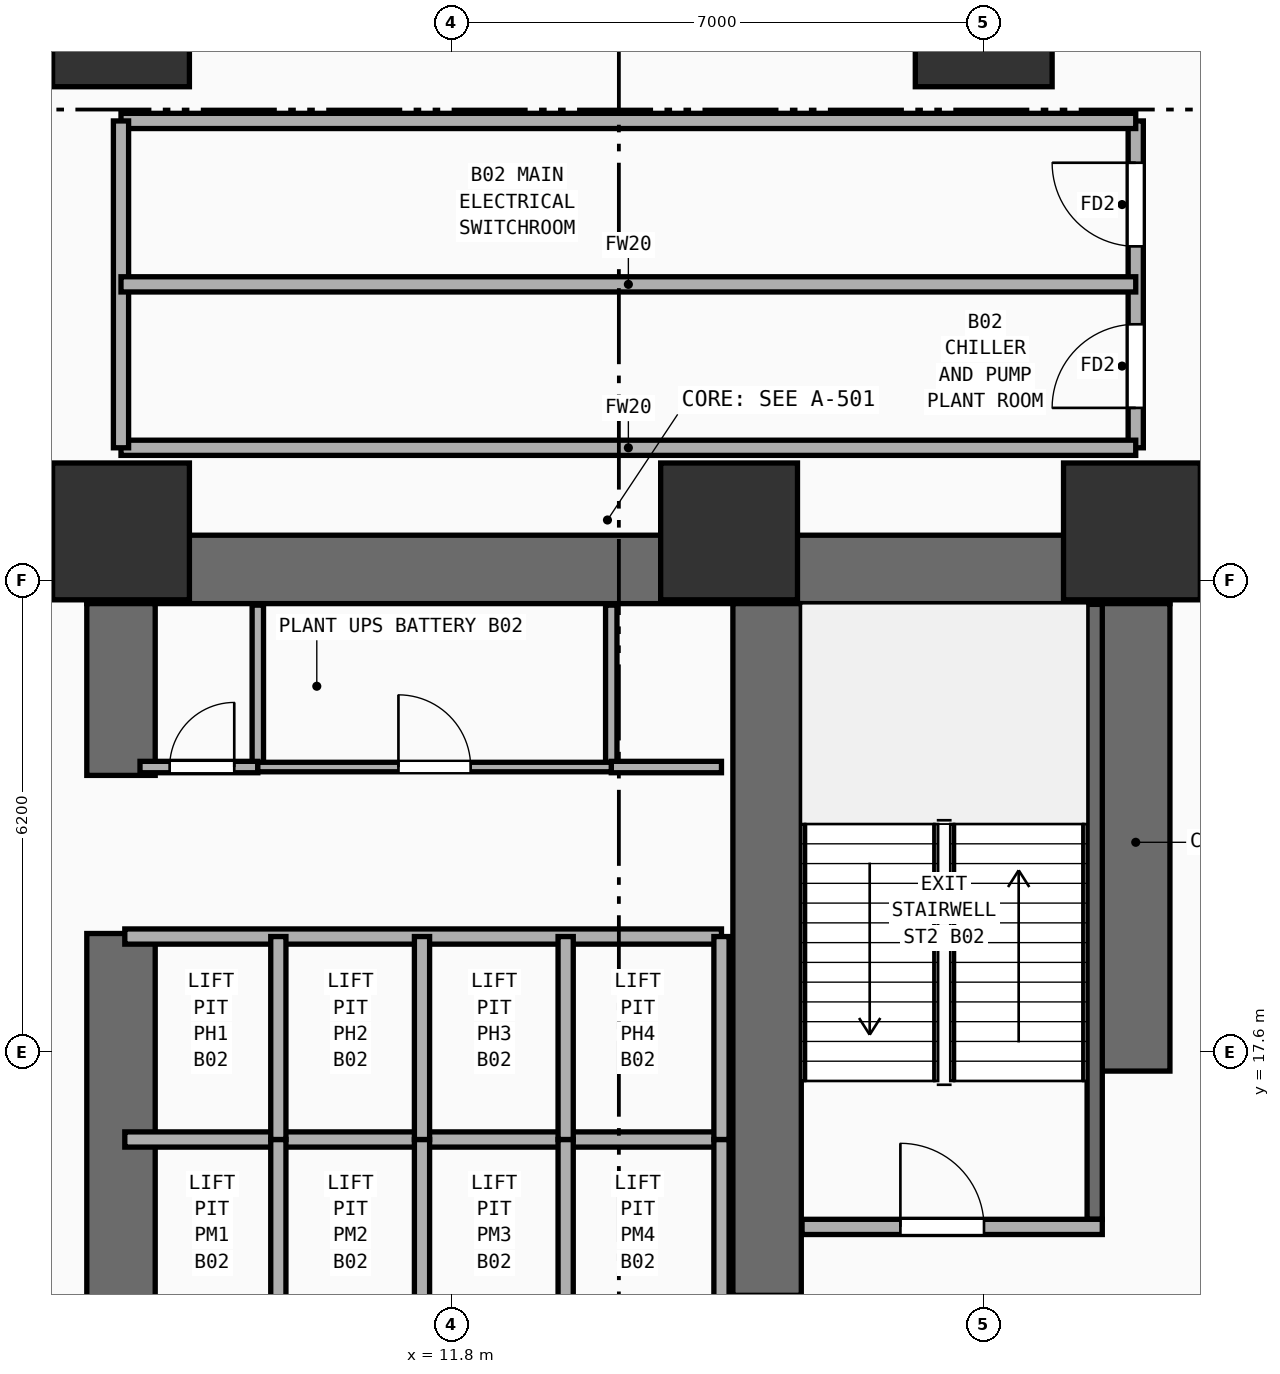
"""IFC4 building model, lengths in metres.
Left out: names, types, materials, properties, quantities, classifications, styles, units other than length and angle.
Written with IfcOpenShell. Run it as: python <this file> out.ifc"""

import sys

from ifc_helpers import new_model, si_unit, direction, frame, frame_2d, origin, origin_2d, place, context, subcontext, project, spatial, rectangle, extrude, element, fill, save


model = new_model("IFC4")
c1 = context("Model", 3, precision=1e-05, world=origin(), true_north=direction((0.0, 1.0)))
c2 = subcontext(c1, "Body", "Model", "MODEL_VIEW")
j1 = project(units=[si_unit("LENGTHUNIT", "METRE"), si_unit("PLANEANGLEUNIT", "RADIAN")], contexts=[c1])
p1 = place(None, origin())
s1 = spatial("IfcSite", under=j1, at=p1, CompositionType="ELEMENT")
p2 = place(p1, origin())
s2 = spatial("IfcBuilding", under=s1, at=p2, CompositionType="ELEMENT")
p3 = place(p2, frame((0.0, 0.0, -8.4)))
s3 = spatial("IfcBuildingStorey", under=s2, at=p3, CompositionType="ELEMENT", Elevation=-8.4)
p4 = place(p3, frame((7.0, 23.95, 0.0), z_axis=(0.0, 0.0, 1.0), x_axis=(1.0, 0.0, 0.0)))
e1 = element("IfcWall", 1, at=p4, inside=s3, PredefinedType="SHEAR", context=c2, shape_type="SweptSolid", body=[
    extrude(rectangle(XDim=14.25, YDim=0.9, at=frame_2d((7.125, 0.0))), origin(), (0.0, 0.0, 1.0), 3.86),
])
p5 = place(p3, frame((7.45, 14.35, 0.0), z_axis=(0.0, 0.0, 1.0), x_axis=(0.0, 1.0, 0.0)))
e2 = element("IfcWall", 2, at=p5, inside=s3, PredefinedType="SHEAR", context=c2, shape_type="SweptSolid", body=[
    extrude(rectangle(XDim=4.81, YDim=0.9, at=frame_2d((2.405, 0.0))), origin(), (0.0, 0.0, 1.0), 3.86),
])
p6 = place(p3, frame((7.45, 21.24, 0.0), z_axis=(0.0, 0.0, 1.0), x_axis=(0.0, 1.0, 0.0)))
e3 = element("IfcWall", 3, at=p6, inside=s3, PredefinedType="SHEAR", context=c2, shape_type="SweptSolid", body=[
    extrude(rectangle(XDim=2.26, YDim=0.9, at=frame_2d((1.13, 0.0))), origin(), (0.0, 0.0, 1.0), 3.86),
])
p7 = place(p3, frame((20.8, 17.35, 0.0), z_axis=(0.0, 0.0, 1.0), x_axis=(0.0, 1.0, 0.0)))
e4 = element("IfcWall", 4, at=p7, inside=s3, PredefinedType="SHEAR", context=c2, shape_type="SweptSolid", body=[
    extrude(rectangle(XDim=6.15, YDim=0.9, at=frame_2d((3.075, 0.0))), origin(), (0.0, 0.0, 1.0), 3.86),
])
p8 = place(p3, frame((15.95, 14.4, 0.0), z_axis=(0.0, 0.0, 1.0), x_axis=(0.0, 1.0, 0.0)))
e5 = element("IfcWall", 5, at=p8, inside=s3, PredefinedType="SHEAR", context=c2, shape_type="SweptSolid", body=[
    extrude(rectangle(XDim=9.1, YDim=0.9, at=frame_2d((4.55, 0.0))), origin(), (0.0, 0.0, 1.0), 3.86),
])
for number, where, z_axis, x_axis in (
    (6, (7.45, 24.45, 0.0), (0.0, 0.0, 1.0), (1.0, 0.0, 0.0)),
    (7, (15.45, 24.45, 0.0), (0.0, 0.0, 1.0), (1.0, 0.0, 0.0)),
    (8, (20.75, 24.45, 0.0), (0.0, 0.0, 1.0), (1.0, 0.0, 0.0)),
    (9, (7.45, 31.2, 0.0), (0.0, 0.0, 1.0), (1.0, 0.0, 0.0)),
    (10, (18.8, 31.2, 0.0), (0.0, 0.0, 1.0), (1.0, 0.0, 0.0)),
):
    element("IfcColumn", number, at=place(p3, frame(where, z_axis=z_axis, x_axis=x_axis)), inside=s3, PredefinedType="COLUMN", context=c2, shape_type="SweptSolid", body=[
        extrude(rectangle(XDim=1.8, YDim=1.8, at=origin_2d()), origin(), (0.0, 0.0, 1.0), 3.86),
    ])
p9 = place(p3, frame((20.26, 15.4, 0.0), z_axis=(0.0, 0.0, 1.0), x_axis=(0.0, 1.0, 0.0)))
e11 = element("IfcWall", 11, at=p9, inside=s3, PredefinedType="SHEAR", context=c2, shape_type="SweptSolid", body=[
    extrude(rectangle(XDim=8.09, YDim=0.2, at=frame_2d((4.045, 0.0))), origin(), (0.0, 0.0, 1.0), 3.86),
])
p10 = place(p3, frame((16.41, 15.3, 0.0), z_axis=(0.0, 0.0, 1.0), x_axis=(1.0, 0.0, 0.0)))
e12 = element("IfcWall", 12, at=p10, inside=s3, PredefinedType="PARTITIONING", context=c2, shape_type="SweptSolid", body=[
    extrude(rectangle(XDim=3.95, YDim=0.2, at=frame_2d((1.975, 0.0))), origin(), (0.0, 0.0, 1.0), 3.86),
])
p11 = place(p10, frame((1.294, 0.0, 0.0)))
e13 = element("IfcOpeningElement", 13, at=p11, cuts=e12, PredefinedType="OPENING", context=c2, shape_type="SweptSolid", body=[
    extrude(rectangle(XDim=1.1, YDim=2.2, at=frame_2d((0.55, 1.1))), frame((0.0, 0.11, 0.0), z_axis=(0.0, -1.0, 0.0), x_axis=(1.0, 0.0, 0.0)), (0.0, 0.0, 1.0), 0.22),
])
p12 = place(p3, frame((7.5, 16.45, 0.0), z_axis=(0.0, 0.0, 1.0), x_axis=(1.0, 0.0, 0.0)))
e14 = element("IfcWall", 14, at=p12, inside=s3, PredefinedType="PARTITIONING", context=c2, shape_type="SweptSolid", body=[
    extrude(rectangle(XDim=7.85, YDim=0.2, at=frame_2d((3.925, 0.0))), origin(), (0.0, 0.0, 1.0), 3.86),
])
for number, where, z_axis, x_axis in (
    (15, (15.35, 14.22, 0.0), (0.0, 0.0, 1.0), (0.0, 1.0, 0.0)),
    (16, (9.52, 14.22, 0.0), (0.0, 0.0, 1.0), (0.0, 1.0, 0.0)),
    (17, (11.41, 14.22, 0.0), (0.0, 0.0, 1.0), (0.0, 1.0, 0.0)),
    (18, (13.3, 14.22, 0.0), (0.0, 0.0, 1.0), (0.0, 1.0, 0.0)),
):
    element("IfcWall", number, at=place(p3, frame(where, z_axis=z_axis, x_axis=x_axis)), inside=s3, PredefinedType="PARTITIONING", context=c2, shape_type="SweptSolid", body=[
        extrude(rectangle(XDim=2.23, YDim=0.2, at=frame_2d((1.115, 0.0))), origin(), (0.0, 0.0, 1.0), 3.86),
    ])
p13 = place(p3, frame((7.5, 19.12, 0.0), z_axis=(0.0, 0.0, 1.0), x_axis=(1.0, 0.0, 0.0)))
e19 = element("IfcWall", 19, at=p13, inside=s3, PredefinedType="PARTITIONING", context=c2, shape_type="SweptSolid", body=[
    extrude(rectangle(XDim=7.85, YDim=0.2, at=frame_2d((3.925, 0.0))), origin(), (0.0, 0.0, 1.0), 3.86),
])
for number, where, z_axis, x_axis in (
    (20, (15.35, 16.45, 0.0), (0.0, 0.0, 1.0), (0.0, 1.0, 0.0)),
    (21, (9.52, 16.45, 0.0), (0.0, 0.0, 1.0), (0.0, 1.0, 0.0)),
    (22, (11.41, 16.45, 0.0), (0.0, 0.0, 1.0), (0.0, 1.0, 0.0)),
    (23, (13.3, 16.45, 0.0), (0.0, 0.0, 1.0), (0.0, 1.0, 0.0)),
):
    element("IfcWall", number, at=place(p3, frame(where, z_axis=z_axis, x_axis=x_axis)), inside=s3, PredefinedType="PARTITIONING", context=c2, shape_type="SweptSolid", body=[
        extrude(rectangle(XDim=2.67, YDim=0.2, at=frame_2d((1.335, 0.0))), origin(), (0.0, 0.0, 1.0), 3.86),
    ])
for number, where, z_axis, x_axis in (
    (24, (9.25, 21.35, 0.0), (0.0, 0.0, 1.0), (0.0, 1.0, 0.0)),
    (25, (13.9, 21.35, 0.0), (0.0, 0.0, 1.0), (0.0, 1.0, 0.0)),
):
    element("IfcWall", number, at=place(p3, frame(where, z_axis=z_axis, x_axis=x_axis)), inside=s3, PredefinedType="PARTITIONING", context=c2, shape_type="SweptSolid", body=[
        extrude(rectangle(XDim=2.13, YDim=0.15, at=frame_2d((1.065, 0.0))), origin(), (0.0, 0.0, 1.0), 3.86),
    ])
p14 = place(p3, frame((7.7, 21.35, 0.0), z_axis=(0.0, 0.0, 1.0), x_axis=(1.0, 0.0, 0.0)))
e26 = element("IfcWall", 26, at=p14, inside=s3, PredefinedType="PARTITIONING", context=c2, shape_type="SweptSolid", body=[
    extrude(rectangle(XDim=1.55, YDim=0.15, at=frame_2d((0.775, 0.0))), origin(), (0.0, 0.0, 1.0), 3.86),
])
p15 = place(p14, frame((0.39, 0.0, 0.0)))
e27 = element("IfcOpeningElement", 27, at=p15, cuts=e26, PredefinedType="OPENING", context=c2, shape_type="SweptSolid", body=[
    extrude(rectangle(XDim=0.85, YDim=2.15, at=frame_2d((0.425, 1.075))), frame((0.0, 0.085, 0.0), z_axis=(0.0, -1.0, 0.0), x_axis=(1.0, 0.0, 0.0)), (0.0, 0.0, 1.0), 0.17),
])
p16 = place(p3, frame((13.9, 21.35, 0.0), z_axis=(0.0, 0.0, 1.0), x_axis=(1.0, 0.0, 0.0)))
e28 = element("IfcWall", 28, at=p16, inside=s3, PredefinedType="PARTITIONING", context=c2, shape_type="SweptSolid", body=[
    extrude(rectangle(XDim=1.45, YDim=0.15, at=frame_2d((0.725, 0.0))), origin(), (0.0, 0.0, 1.0), 3.86),
])
p17 = place(p3, frame((9.25, 21.35, 0.0), z_axis=(0.0, 0.0, 1.0), x_axis=(1.0, 0.0, 0.0)))
e29 = element("IfcWall", 29, at=p17, inside=s3, PredefinedType="PARTITIONING", context=c2, shape_type="SweptSolid", body=[
    extrude(rectangle(XDim=4.65, YDim=0.125, at=frame_2d((2.325, 0.0))), origin(), (0.0, 0.0, 1.0), 3.86),
])
p18 = place(p17, frame((1.85, 0.0, 0.0)))
e30 = element("IfcOpeningElement", 30, at=p18, cuts=e29, PredefinedType="OPENING", context=c2, shape_type="SweptSolid", body=[
    extrude(rectangle(XDim=0.95, YDim=2.15, at=frame_2d((0.475, 1.075))), frame((0.0, 0.073, 0.0), z_axis=(0.0, -1.0, 0.0), x_axis=(1.0, 0.0, 0.0)), (0.0, 0.0, 1.0), 0.145),
])
p19 = place(p3, frame((20.8, 25.55, 0.0), z_axis=(0.0, 0.0, 1.0), x_axis=(0.0, 1.0, 0.0)))
e31 = element("IfcWall", 31, at=p19, inside=s3, PredefinedType="PARTITIONING", context=c2, shape_type="SweptSolid", body=[
    extrude(rectangle(XDim=4.3, YDim=0.2, at=frame_2d((2.15, 0.0))), origin(), (0.0, 0.0, 1.0), 3.86),
])
p20 = place(p19, frame((0.525, 0.0, 0.0)))
e32 = element("IfcOpeningElement", 32, at=p20, cuts=e31, PredefinedType="OPENING", context=c2, shape_type="SweptSolid", body=[
    extrude(rectangle(XDim=1.1, YDim=2.2, at=frame_2d((0.55, 1.1))), frame((0.0, 0.11, 0.0), z_axis=(0.0, -1.0, 0.0), x_axis=(1.0, 0.0, 0.0)), (0.0, 0.0, 1.0), 0.22),
])
p21 = place(p19, frame((2.65, 0.0, 0.0)))
e33 = element("IfcOpeningElement", 33, at=p21, cuts=e31, PredefinedType="OPENING", context=c2, shape_type="SweptSolid", body=[
    extrude(rectangle(XDim=1.1, YDim=2.2, at=frame_2d((0.55, 1.1))), frame((0.0, 0.11, 0.0), z_axis=(0.0, -1.0, 0.0), x_axis=(1.0, 0.0, 0.0)), (0.0, 0.0, 1.0), 0.22),
])
for number, where, z_axis, x_axis in (
    (34, (7.45, 25.55, 0.0), (0.0, 0.0, 1.0), (1.0, 0.0, 0.0)),
    (35, (7.45, 29.85, 0.0), (0.0, 0.0, 1.0), (1.0, 0.0, 0.0)),
):
    element("IfcWall", number, at=place(p3, frame(where, z_axis=z_axis, x_axis=x_axis)), inside=s3, PredefinedType="PARTITIONING", context=c2, shape_type="SweptSolid", body=[
        extrude(rectangle(XDim=13.35, YDim=0.2, at=frame_2d((6.675, 0.0))), origin(), (0.0, 0.0, 1.0), 3.86),
    ])
p22 = place(p3, frame((7.45, 25.55, 0.0), z_axis=(0.0, 0.0, 1.0), x_axis=(0.0, 1.0, 0.0)))
e36 = element("IfcWall", 36, at=p22, inside=s3, PredefinedType="PARTITIONING", context=c2, shape_type="SweptSolid", body=[
    extrude(rectangle(XDim=4.3, YDim=0.2, at=frame_2d((2.15, 0.0))), origin(), (0.0, 0.0, 1.0), 3.21),
])
p23 = place(p3, frame((7.45, 27.7, 0.0), z_axis=(0.0, 0.0, 1.0), x_axis=(1.0, 0.0, 0.0)))
e37 = element("IfcWall", 37, at=p23, inside=s3, PredefinedType="PARTITIONING", context=c2, shape_type="SweptSolid", body=[
    extrude(rectangle(XDim=13.35, YDim=0.2, at=frame_2d((6.675, 0.0))), origin(), (0.0, 0.0, 1.0), 3.86),
])
p24 = place(p11, origin())
e38 = element("IfcDoor", 38, at=p24, inside=s3, OperationType="SINGLE_SWING_LEFT", PredefinedType="DOOR", context=c2, shape_type="SweptSolid", body=[
    extrude(rectangle(XDim=1.1, YDim=2.2, at=frame_2d((0.55, 1.1))), frame((0.0, 0.025, 0.0), z_axis=(0.0, -1.0, 0.0), x_axis=(1.0, 0.0, 0.0)), (0.0, 0.0, 1.0), 0.05),
])
fill(e13, e38)
p25 = place(p15, origin())
e39 = element("IfcDoor", 39, at=p25, inside=s3, OperationType="SINGLE_SWING_RIGHT", PredefinedType="DOOR", context=c2, shape_type="SweptSolid", body=[
    extrude(rectangle(XDim=0.85, YDim=2.15, at=frame_2d((0.425, 1.075))), frame((0.0, 0.025, 0.0), z_axis=(0.0, -1.0, 0.0), x_axis=(1.0, 0.0, 0.0)), (0.0, 0.0, 1.0), 0.05),
])
fill(e27, e39)
p26 = place(p18, origin())
e40 = element("IfcDoor", 40, at=p26, inside=s3, OperationType="SINGLE_SWING_LEFT", PredefinedType="DOOR", context=c2, shape_type="SweptSolid", body=[
    extrude(rectangle(XDim=0.95, YDim=2.15, at=frame_2d((0.475, 1.075))), frame((0.0, 0.025, 0.0), z_axis=(0.0, -1.0, 0.0), x_axis=(1.0, 0.0, 0.0)), (0.0, 0.0, 1.0), 0.05),
])
fill(e30, e40)
p27 = place(p20, frame((1.1, 0.0, 0.0), z_axis=(0.0, 0.0, 1.0), x_axis=(-1.0, 0.0, 0.0)))
e41 = element("IfcDoor", 41, at=p27, inside=s3, OperationType="SINGLE_SWING_RIGHT", PredefinedType="DOOR", context=c2, shape_type="SweptSolid", body=[
    extrude(rectangle(XDim=1.1, YDim=2.2, at=frame_2d((0.55, 1.1))), frame((0.0, 0.025, 0.0), z_axis=(0.0, -1.0, 0.0), x_axis=(1.0, 0.0, 0.0)), (0.0, 0.0, 1.0), 0.05),
])
fill(e32, e41)
p28 = place(p21, frame((1.1, 0.0, 0.0), z_axis=(0.0, 0.0, 1.0), x_axis=(-1.0, 0.0, 0.0)))
e42 = element("IfcDoor", 42, at=p28, inside=s3, OperationType="SINGLE_SWING_LEFT", PredefinedType="DOOR", context=c2, shape_type="SweptSolid", body=[
    extrude(rectangle(XDim=1.1, YDim=2.2, at=frame_2d((0.55, 1.1))), frame((0.0, 0.025, 0.0), z_axis=(0.0, -1.0, 0.0), x_axis=(1.0, 0.0, 0.0)), (0.0, 0.0, 1.0), 0.05),
])
fill(e33, e42)
save(model, sys.argv[1])
